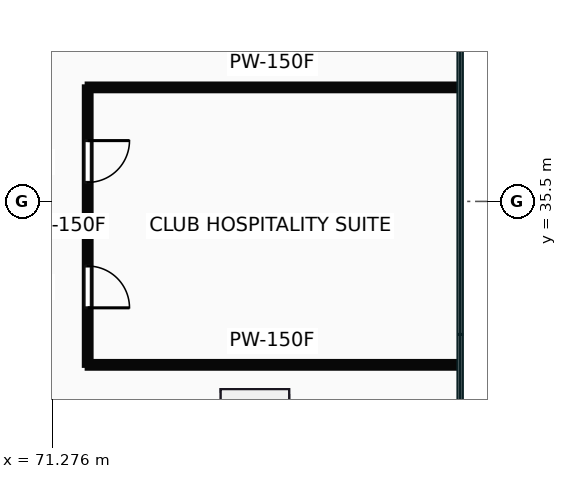
"""IFC4 building model, lengths in metres.
Left out: names, types, materials, properties, quantities, classifications, styles, units other than length and angle.
Written with IfcOpenShell. Run it as: python <this file> out.ifc"""

import sys

from ifc_helpers import new_model, si_unit, direction, frame, frame_2d, origin, place, context, subcontext, project, spatial, rectangle, extrude, source, transform, mapped, element, fill, save


model = new_model("IFC4")
c1 = context("Model", 3, precision=1e-05, world=origin(), true_north=direction((0.0, 1.0)))
c2 = subcontext(c1, "Body", "Model", "MODEL_VIEW")
j1 = project(units=[si_unit("LENGTHUNIT", "METRE"), si_unit("PLANEANGLEUNIT", "RADIAN")], contexts=[c1])
p1 = place(None, origin())
s1 = spatial("IfcSite", under=j1, at=p1, CompositionType="ELEMENT")
p2 = place(p1, origin())
s2 = spatial("IfcBuilding", under=s1, at=p2, CompositionType="ELEMENT")
p3 = place(p2, frame((0.0, 0.0, 11.0)))
s3 = spatial("IfcBuildingStorey", under=s2, at=p3, CompositionType="ELEMENT", Elevation=11.0)
m1 = source(origin(), c2, "Body", "SweptSolid", [
    extrude(rectangle(XDim=7.3, YDim=0.15, at=frame_2d((3.65, 0.0))), origin(), (0.0, 0.0, 1.0), 4.7),
])
p4 = place(p3, frame((72.2, 31.2, 0.0), z_axis=(0.0, 0.0, 1.0), x_axis=(0.0, 1.0, 0.0)))
e1 = element("IfcWall", 1, at=p4, inside=s3, PredefinedType="PARTITIONING", context=c2, shape_type="MappedRepresentation", body=[
    mapped(m1, transform((0.0, 0.0, 0.0))),
])
p5 = place(p4, frame((1.5, 0.0, 0.0)))
e2 = element("IfcOpeningElement", 2, at=p5, cuts=e1, PredefinedType="OPENING", context=c2, shape_type="SweptSolid", body=[
    extrude(rectangle(XDim=1.1, YDim=2.15, at=frame_2d((0.55, 1.075))), frame((0.0, 0.085, 0.0), z_axis=(0.0, -1.0, 0.0), x_axis=(1.0, 0.0, 0.0)), (0.0, 0.0, 1.0), 0.17),
])
p6 = place(p4, frame((4.8, 0.0, 0.0)))
e3 = element("IfcOpeningElement", 3, at=p6, cuts=e1, PredefinedType="OPENING", context=c2, shape_type="SweptSolid", body=[
    extrude(rectangle(XDim=1.1, YDim=2.15, at=frame_2d((0.55, 1.075))), frame((0.0, 0.085, 0.0), z_axis=(0.0, -1.0, 0.0), x_axis=(1.0, 0.0, 0.0)), (0.0, 0.0, 1.0), 0.17),
])
m2 = source(origin(), c2, "Body", "SweptSolid", [
    extrude(rectangle(XDim=9.7, YDim=0.15, at=frame_2d((4.85, 0.0))), origin(), (0.0, 0.0, 1.0), 4.7),
])
for number, where, z_axis, x_axis in (
    (4, (72.2, 31.2, 0.0), (0.0, 0.0, 1.0), (1.0, 0.0, 0.0)),
    (5, (72.2, 38.5, 0.0), (0.0, 0.0, 1.0), (1.0, 0.0, 0.0)),
):
    element("IfcWall", number, at=place(p3, frame(where, z_axis=z_axis, x_axis=x_axis)), inside=s3, PredefinedType="PARTITIONING", context=c2, shape_type="MappedRepresentation", body=[
        mapped(m2, transform((0.0, 0.0, 0.0))),
    ])
m3 = source(origin(), c2, "Body", "SweptSolid", [
    extrude(rectangle(XDim=1.1, YDim=2.15, at=frame_2d((0.55, 1.075))), frame((0.0, 0.025, 0.0), z_axis=(0.0, -1.0, 0.0), x_axis=(1.0, 0.0, 0.0)), (0.0, 0.0, 1.0), 0.05),
])
p7 = place(p5, frame((1.1, 0.0, 0.0), z_axis=(0.0, 0.0, 1.0), x_axis=(-1.0, 0.0, 0.0)))
e6 = element("IfcDoor", 6, at=p7, inside=s3, OperationType="SINGLE_SWING_LEFT", PredefinedType="DOOR", context=c2, shape_type="MappedRepresentation", body=[
    mapped(m3, transform((0.0, 0.0, 0.0))),
])
fill(e2, e6)
p8 = place(p6, frame((1.1, 0.0, 0.0), z_axis=(0.0, 0.0, 1.0), x_axis=(-1.0, 0.0, 0.0)))
e7 = element("IfcDoor", 7, at=p8, inside=s3, OperationType="SINGLE_SWING_RIGHT", PredefinedType="DOOR", context=c2, shape_type="MappedRepresentation", body=[
    mapped(m3, transform((0.0, 0.0, 0.0))),
])
fill(e3, e7)
save(model, sys.argv[1])
